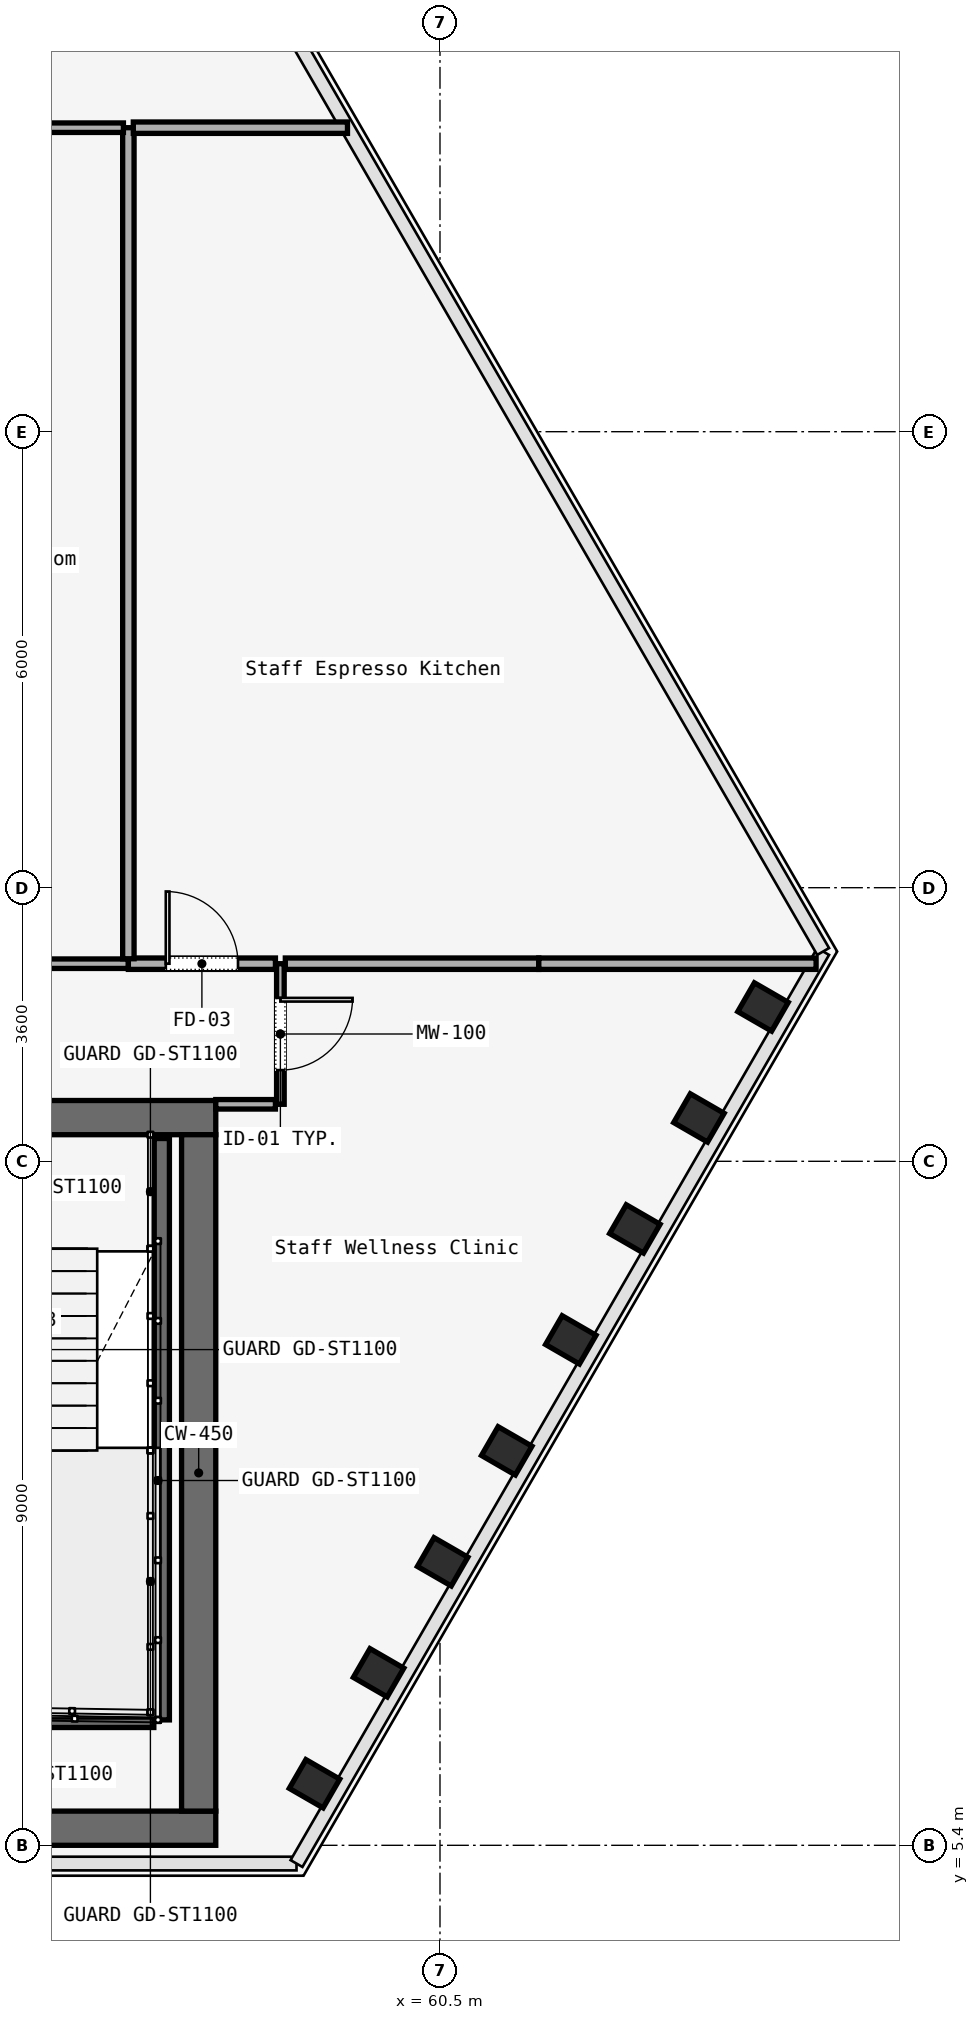
"""IFC4 building model, lengths in metres.
Left out: names, types, materials, properties, quantities, classifications, styles, units other than length and angle.
Written with IfcOpenShell. Run it as: python <this file> out.ifc"""

import sys

from ifc_helpers import new_model, si_unit, direction, frame, frame_2d, origin, origin_2d, place, context, subcontext, project, spatial, rectangle, i_section, extrude, element, fill, save


model = new_model("IFC4")
c1 = context("Model", 3, precision=1e-05, world=origin(), true_north=direction((0.0, 1.0)))
c2 = subcontext(c1, "Body", "Model", "MODEL_VIEW")
j1 = project(units=[si_unit("LENGTHUNIT", "METRE"), si_unit("PLANEANGLEUNIT", "RADIAN")], contexts=[c1])
p1 = place(None, origin())
s1 = spatial("IfcSite", under=j1, at=p1, CompositionType="ELEMENT")
p2 = place(p1, origin())
s2 = spatial("IfcBuilding", under=s1, at=p2, CompositionType="ELEMENT")
p3 = place(p2, frame((0.0, 0.0, 96.8)))
s3 = spatial("IfcBuildingStorey", under=s2, at=p3, CompositionType="ELEMENT", Elevation=96.8)
p4 = place(p3, frame((26.45, 14.975, 0.0), z_axis=(0.0, 0.0, 1.0), x_axis=(1.0, 0.0, 0.0)))
e1 = element("IfcWall", 1, at=p4, inside=s3, PredefinedType="SOLIDWALL", context=c2, shape_type="SweptSolid", body=[
    extrude(rectangle(XDim=31.1, YDim=0.45, at=frame_2d((15.55, 0.0))), origin(), (0.0, 0.0, 1.0), 3.58),
])
p5 = place(p4, frame((1.65, 0.0, 0.0)))
e2 = element("IfcOpeningElement", 2, at=p5, cuts=e1, PredefinedType="OPENING", context=c2, shape_type="SweptSolid", body=[
    extrude(rectangle(XDim=1.1, YDim=2.2, at=frame_2d((0.55, 1.1))), frame((0.0, 0.225, 0.0), z_axis=(0.0, -1.0, 0.0), x_axis=(1.0, 0.0, 0.0)), (0.0, 0.0, 1.0), 0.45),
])
p6 = place(p4, frame((13.65, 0.0, 0.0)))
e3 = element("IfcOpeningElement", 3, at=p6, cuts=e1, PredefinedType="OPENING", context=c2, shape_type="SweptSolid", body=[
    extrude(rectangle(XDim=1.1, YDim=2.2, at=frame_2d((0.55, 1.1))), frame((0.0, 0.225, 0.0), z_axis=(0.0, -1.0, 0.0), x_axis=(1.0, 0.0, 0.0)), (0.0, 0.0, 1.0), 0.45),
])
p7 = place(p4, frame((25.55, 0.0, 0.0)))
e4 = element("IfcOpeningElement", 4, at=p7, cuts=e1, PredefinedType="OPENING", context=c2, shape_type="SweptSolid", body=[
    extrude(rectangle(XDim=1.1, YDim=2.2, at=frame_2d((0.55, 1.1))), frame((0.0, 0.225, 0.0), z_axis=(0.0, -1.0, 0.0), x_axis=(1.0, 0.0, 0.0)), (0.0, 0.0, 1.0), 0.45),
])
p8 = place(p4, frame((10.7, 0.0, 0.0)))
e5 = element("IfcOpeningElement", 5, at=p8, cuts=e1, PredefinedType="OPENING", context=c2, shape_type="SweptSolid", body=[
    extrude(rectangle(XDim=1.4, YDim=2.2, at=frame_2d((0.7, 1.1))), frame((0.0, 0.225, 0.0), z_axis=(0.0, -1.0, 0.0), x_axis=(1.0, 0.0, 0.0)), (0.0, 0.0, 1.0), 0.45),
])
p9 = place(p4, frame((19.35, 0.0, 0.0)))
e6 = element("IfcOpeningElement", 6, at=p9, cuts=e1, PredefinedType="OPENING", context=c2, shape_type="SweptSolid", body=[
    extrude(rectangle(XDim=1.1, YDim=2.2, at=frame_2d((0.55, 1.1))), frame((0.0, 0.225, 0.0), z_axis=(0.0, -1.0, 0.0), x_axis=(1.0, 0.0, 0.0)), (0.0, 0.0, 1.0), 0.45),
])
p10 = place(p4, frame((21.4, 0.0, 0.0)))
e7 = element("IfcOpeningElement", 7, at=p10, cuts=e1, PredefinedType="OPENING", context=c2, shape_type="SweptSolid", body=[
    extrude(rectangle(XDim=0.9, YDim=2.1, at=frame_2d((0.45, 1.05))), frame((0.0, 0.225, 0.0), z_axis=(0.0, -1.0, 0.0), x_axis=(1.0, 0.0, 0.0)), (0.0, 0.0, 1.0), 0.45),
])
p11 = place(p4, frame((23.35, 0.0, 0.0)))
e8 = element("IfcOpeningElement", 8, at=p11, cuts=e1, PredefinedType="OPENING", context=c2, shape_type="SweptSolid", body=[
    extrude(rectangle(XDim=1.3, YDim=2.3, at=frame_2d((0.65, 1.15))), frame((0.0, 0.225, 0.0), z_axis=(0.0, -1.0, 0.0), x_axis=(1.0, 0.0, 0.0)), (0.0, 0.0, 1.0), 0.45),
])
p12 = place(p3, frame((26.45, 5.625, 0.0), z_axis=(0.0, 0.0, 1.0), x_axis=(1.0, 0.0, 0.0)))
e9 = element("IfcWall", 9, at=p12, inside=s3, PredefinedType="SOLIDWALL", context=c2, shape_type="SweptSolid", body=[
    extrude(rectangle(XDim=31.1, YDim=0.45, at=frame_2d((15.55, 0.0))), origin(), (0.0, 0.0, 1.0), 3.58),
])
p13 = place(p3, frame((57.325, 5.85, 0.0), z_axis=(0.0, 0.0, 1.0), x_axis=(0.0, 1.0, 0.0)))
e10 = element("IfcWall", 10, at=p13, inside=s3, PredefinedType="SOLIDWALL", context=c2, shape_type="SweptSolid", body=[
    extrude(rectangle(XDim=8.9, YDim=0.45, at=frame_2d((4.45, 0.0))), origin(), (0.0, 0.0, 1.0), 3.58),
])
p14 = place(p3, frame((58.849, 6.21, 0.0), z_axis=(0.054069822092, -0.005652135055, 0.998521160371), x_axis=(-0.808074623925, 0.587195693912, 0.047080985746)))
e11 = element("IfcColumn", 11, at=p14, inside=s3, PredefinedType="COLUMN", context=c2, shape_type="SweptSolid", body=[
    extrude(i_section(OverallWidth=0.437, OverallDepth=0.514, WebThickness=0.061, FlangeThickness=0.077, FilletRadius=0.015, at=origin_2d()), origin(), (0.0, 0.0, 1.0), 3.585),
])
p15 = place(p3, frame((59.692, 7.67, 0.0), z_axis=(0.047474003904, -0.017164202272, 0.998724991734), x_axis=(-0.643386474884, 0.764292189396, 0.043718338998)))
e12 = element("IfcColumn", 12, at=p15, inside=s3, PredefinedType="COLUMN", context=c2, shape_type="SweptSolid", body=[
    extrude(i_section(OverallWidth=0.437, OverallDepth=0.514, WebThickness=0.061, FlangeThickness=0.077, FilletRadius=0.015, at=origin_2d()), origin(), (0.0, 0.0, 1.0), 3.584),
])
p16 = place(p3, frame((60.535, 9.13, 0.0), z_axis=(0.040936452002, -0.028539722777, 0.998754069389), x_axis=(-0.42358129763, 0.904826587054, 0.043217261123)))
e13 = element("IfcColumn", 13, at=p16, inside=s3, PredefinedType="COLUMN", context=c2, shape_type="SweptSolid", body=[
    extrude(i_section(OverallWidth=0.437, OverallDepth=0.514, WebThickness=0.061, FlangeThickness=0.077, FilletRadius=0.015, at=origin_2d()), origin(), (0.0, 0.0, 1.0), 3.584),
])
p17 = place(p3, frame((61.378, 10.59, 0.0), z_axis=(0.034324388219, -0.040045119589, 0.998608143753), x_axis=(-0.183189108022, 0.982015997466, 0.045676377068)))
e14 = element("IfcColumn", 14, at=p17, inside=s3, PredefinedType="COLUMN", context=c2, shape_type="SweptSolid", body=[
    extrude(i_section(OverallWidth=0.437, OverallDepth=0.514, WebThickness=0.061, FlangeThickness=0.077, FilletRadius=0.015, at=origin_2d()), origin(), (0.0, 0.0, 1.0), 3.585),
])
p18 = place(p3, frame((62.221, 12.05, 0.0), z_axis=(0.027709573034, -0.051402279216, 0.998293536618), x_axis=(0.029880740792, 0.998273324431, 0.050571840581)))
e15 = element("IfcColumn", 15, at=p18, inside=s3, PredefinedType="COLUMN", context=c2, shape_type="SweptSolid", body=[
    extrude(i_section(OverallWidth=0.437, OverallDepth=0.514, WebThickness=0.061, FlangeThickness=0.077, FilletRadius=0.015, at=origin_2d()), origin(), (0.0, 0.0, 1.0), 3.586),
])
p19 = place(p3, frame((63.064, 13.51, 0.0), z_axis=(0.021027083222, -0.062877103228, 0.99779974527), x_axis=(0.200130658839, 0.978085358309, 0.057417342801)))
e16 = element("IfcColumn", 16, at=p19, inside=s3, PredefinedType="COLUMN", context=c2, shape_type="SweptSolid", body=[
    extrude(i_section(OverallWidth=0.437, OverallDepth=0.514, WebThickness=0.061, FlangeThickness=0.077, FilletRadius=0.015, at=origin_2d()), origin(), (0.0, 0.0, 1.0), 3.588),
])
p20 = place(p3, frame((63.907, 14.971, 0.0), z_axis=(0.014416733271, -0.074259777036, 0.997134716734), x_axis=(0.326260743048, 0.943006977722, 0.065511583042)))
e17 = element("IfcColumn", 17, at=p20, inside=s3, PredefinedType="COLUMN", context=c2, shape_type="SweptSolid", body=[
    extrude(i_section(OverallWidth=0.437, OverallDepth=0.514, WebThickness=0.061, FlangeThickness=0.077, FilletRadius=0.015, at=origin_2d()), origin(), (0.0, 0.0, 1.0), 3.59),
])
p21 = place(p3, frame((64.75, 16.431, 0.0), z_axis=(0.007813879948, -0.085544998738, 0.996303666796), x_axis=(0.419441460984, 0.904729024715, 0.074392557737)))
e18 = element("IfcColumn", 18, at=p21, inside=s3, PredefinedType="COLUMN", context=c2, shape_type="SweptSolid", body=[
    extrude(i_section(OverallWidth=0.437, OverallDepth=0.514, WebThickness=0.061, FlangeThickness=0.077, FilletRadius=0.015, at=origin_2d()), origin(), (0.0, 0.0, 1.0), 3.593),
])
p22 = place(p3, frame((56.84, 14.7, 0.0), z_axis=(0.0, 0.0, 1.0), x_axis=(0.0, -1.0, 0.0)))
e19 = element("IfcWall", 19, at=p22, inside=s3, PredefinedType="SOLIDWALL", context=c2, shape_type="SweptSolid", body=[
    extrude(rectangle(XDim=7.65, YDim=0.2, at=frame_2d((3.825, 0.0))), origin(), (0.0, 0.0, 1.0), 3.8),
])
p23 = place(p3, frame((53.62, 7.05, 0.0), z_axis=(0.0, 0.0, 1.0), x_axis=(1.0, 0.0, 0.0)))
e20 = element("IfcWall", 20, at=p23, inside=s3, PredefinedType="SOLIDWALL", context=c2, shape_type="SweptSolid", body=[
    extrude(rectangle(XDim=3.115, YDim=0.2, at=frame_2d((1.558, 0.0))), origin(), (0.0, 0.0, 1.0), 3.8),
])
p24 = place(p3, frame((58.4, 17.0, 0.0), z_axis=(0.0, 0.0, 1.0), x_axis=(0.0, -1.0, 0.0)))
e21 = element("IfcWall", 21, at=p24, inside=s3, PredefinedType="MOVABLE", context=c2, shape_type="SweptSolid", body=[
    extrude(rectangle(XDim=1.85, YDim=0.1, at=frame_2d((0.925, 0.0))), origin(), (0.0, 0.0, 1.0), 2.95),
])
p25 = place(p24, frame((0.45, 0.0, 0.0)))
e22 = element("IfcOpeningElement", 22, at=p25, cuts=e21, PredefinedType="OPENING", context=c2, shape_type="SweptSolid", body=[
    extrude(rectangle(XDim=0.95, YDim=2.2, at=frame_2d((0.475, 1.1))), frame((0.0, 0.05, 0.0), z_axis=(0.0, -1.0, 0.0), x_axis=(1.0, 0.0, 0.0)), (0.0, 0.0, 1.0), 0.1),
])
p26 = place(p3, frame((58.335, 15.15, 0.0), z_axis=(0.0, 0.0, 1.0), x_axis=(-1.0, 0.0, 0.0)))
e23 = element("IfcWall", 23, at=p26, inside=s3, PredefinedType="PARTITIONING", context=c2, shape_type="SweptSolid", body=[
    extrude(rectangle(XDim=0.785, YDim=0.125, at=frame_2d((0.393, 0.0))), origin(), (0.0, 0.0, 1.0), 2.95),
])
p27 = place(p3, frame((51.2, 17.0, 0.0), z_axis=(0.0, 0.0, 1.0), x_axis=(1.0, 0.0, 0.0)))
e24 = element("IfcWall", 24, at=p27, inside=s3, PredefinedType="PARTITIONING", context=c2, shape_type="SweptSolid", body=[
    extrude(rectangle(XDim=5.2, YDim=0.125, at=frame_2d((2.6, 0.0))), origin(), (0.0, 0.0, 1.0), 2.95),
])
p28 = place(p27, frame((2.125, 0.0, 0.0)))
e25 = element("IfcOpeningElement", 25, at=p28, cuts=e24, PredefinedType="OPENING", context=c2, shape_type="SweptSolid", body=[
    extrude(rectangle(XDim=0.95, YDim=2.2, at=frame_2d((0.475, 1.1))), frame((0.0, 0.062, 0.0), z_axis=(0.0, -1.0, 0.0), x_axis=(1.0, 0.0, 0.0)), (0.0, 0.0, 1.0), 0.125),
])
p29 = place(p3, frame((56.4, 17.0, 0.0), z_axis=(0.0, 0.0, 1.0), x_axis=(1.0, 0.0, 0.0)))
e26 = element("IfcWall", 26, at=p29, inside=s3, PredefinedType="PARTITIONING", context=c2, shape_type="SweptSolid", body=[
    extrude(rectangle(XDim=1.935, YDim=0.15, at=frame_2d((0.968, 0.0))), origin(), (0.0, 0.0, 1.0), 2.95),
])
p30 = place(p29, frame((0.492, 0.0, 0.0)))
e27 = element("IfcOpeningElement", 27, at=p30, cuts=e26, PredefinedType="OPENING", context=c2, shape_type="SweptSolid", body=[
    extrude(rectangle(XDim=0.95, YDim=2.2, at=frame_2d((0.475, 1.1))), frame((0.0, 0.075, 0.0), z_axis=(0.0, -1.0, 0.0), x_axis=(1.0, 0.0, 0.0)), (0.0, 0.0, 1.0), 0.15),
])
p31 = place(p3, frame((58.465, 17.0, 0.0), z_axis=(0.0, 0.0, 1.0), x_axis=(1.0, 0.0, 0.0)))
e28 = element("IfcWall", 28, at=p31, inside=s3, PredefinedType="PARTITIONING", context=c2, shape_type="SweptSolid", body=[
    extrude(rectangle(XDim=3.335, YDim=0.15, at=frame_2d((1.667, 0.0))), origin(), (0.0, 0.0, 1.0), 2.95),
])
p32 = place(p3, frame((61.8, 17.0, 0.0), z_axis=(0.0, 0.0, 1.0), x_axis=(1.0, 0.0, 0.0)))
e29 = element("IfcWall", 29, at=p32, inside=s3, PredefinedType="PARTITIONING", context=c2, shape_type="SweptSolid", body=[
    extrude(rectangle(XDim=3.648, YDim=0.15, at=frame_2d((1.824, 0.0))), origin(), (0.0, 0.0, 1.0), 2.95),
])
p33 = place(p3, frame((56.4, 17.065, 0.0), z_axis=(0.0, 0.0, 1.0), x_axis=(0.0, 1.0, 0.0)))
e30 = element("IfcWall", 30, at=p33, inside=s3, PredefinedType="PARTITIONING", context=c2, shape_type="SweptSolid", body=[
    extrude(rectangle(XDim=10.935, YDim=0.15, at=frame_2d((5.468, 0.0))), origin(), (0.0, 0.0, 1.0), 2.95),
])
p34 = place(p3, frame((56.465, 28.0, 0.0), z_axis=(0.0, 0.0, 1.0), x_axis=(1.0, 0.0, 0.0)))
e31 = element("IfcWall", 31, at=p34, inside=s3, PredefinedType="PARTITIONING", context=c2, shape_type="SweptSolid", body=[
    extrude(rectangle(XDim=2.818, YDim=0.15, at=frame_2d((1.409, 0.0))), origin(), (0.0, 0.0, 1.0), 2.95),
])
p35 = place(p3, frame((52.2, 28.0, 0.0), z_axis=(0.0, 0.0, 1.0), x_axis=(1.0, 0.0, 0.0)))
e32 = element("IfcWall", 32, at=p35, inside=s3, PredefinedType="PARTITIONING", context=c2, shape_type="SweptSolid", body=[
    extrude(rectangle(XDim=4.135, YDim=0.125, at=frame_2d((2.067, 0.0))), origin(), (0.0, 0.0, 1.0), 2.95),
])
p36 = place(p25, origin())
e33 = element("IfcDoor", 33, at=p36, inside=s3, OperationType="SINGLE_SWING_RIGHT", PredefinedType="DOOR", context=c2, shape_type="SweptSolid", body=[
    extrude(rectangle(XDim=0.95, YDim=2.2, at=frame_2d((0.475, 1.1))), frame((0.0, 0.025, 0.0), z_axis=(0.0, -1.0, 0.0), x_axis=(1.0, 0.0, 0.0)), (0.0, 0.0, 1.0), 0.05),
])
fill(e22, e33)
p37 = place(p30, origin())
e34 = element("IfcDoor", 34, at=p37, inside=s3, OperationType="SINGLE_SWING_RIGHT", PredefinedType="DOOR", context=c2, shape_type="SweptSolid", body=[
    extrude(rectangle(XDim=0.95, YDim=2.2, at=frame_2d((0.475, 1.1))), frame((0.0, 0.025, 0.0), z_axis=(0.0, -1.0, 0.0), x_axis=(1.0, 0.0, 0.0)), (0.0, 0.0, 1.0), 0.05),
])
fill(e27, e34)
save(model, sys.argv[1])
